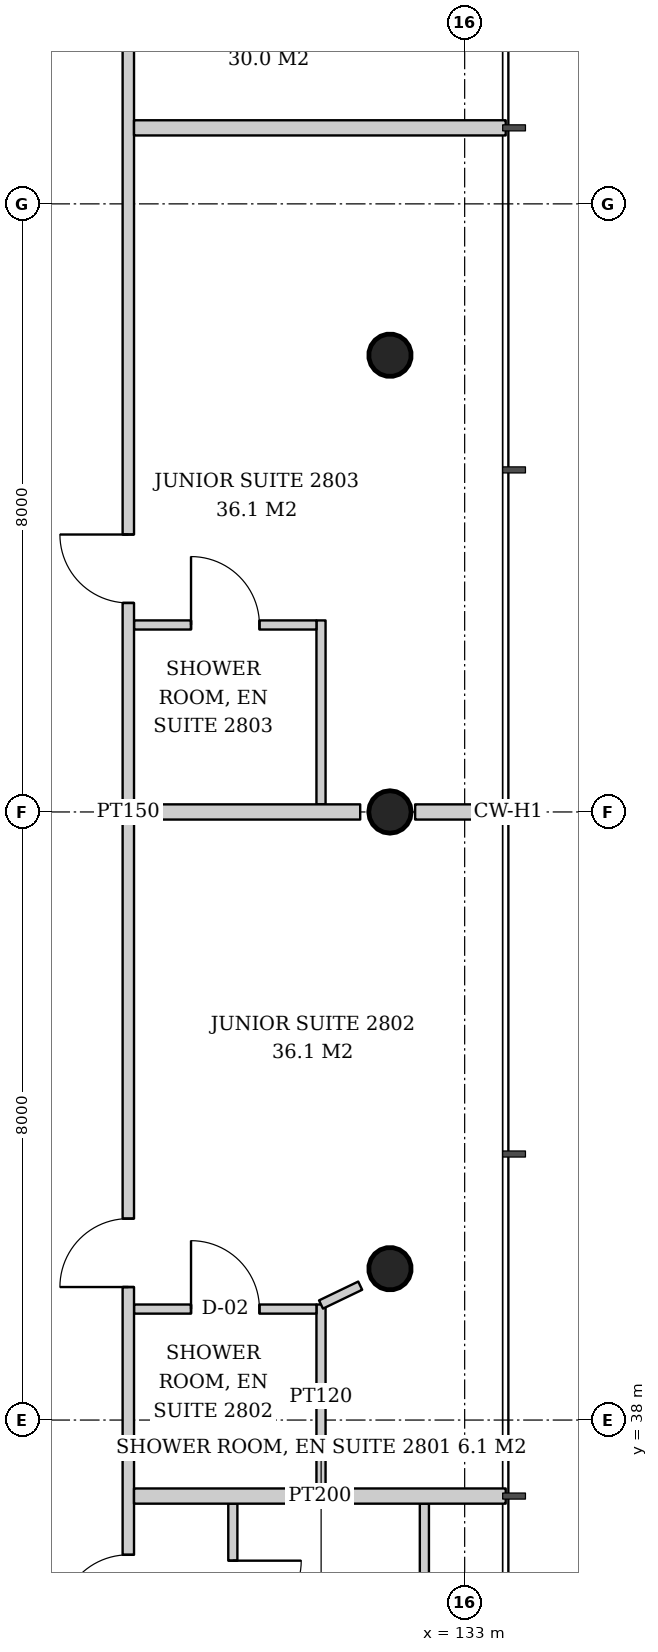
"""IFC4 building model, lengths in metres.
Left out: names, types, materials, properties, quantities, classifications, styles, units other than length and angle.
Written with IfcOpenShell. Run it as: python <this file> out.ifc"""

import sys

from ifc_helpers import new_model, si_unit, direction, frame, frame_2d, origin, origin_2d, place, context, subcontext, project, spatial, rectangle, hollow_circle, extrude, element, fill, save


model = new_model("IFC4")
c1 = context("Model", 3, precision=1e-05, world=origin(), true_north=direction((0.0, 1.0)))
c2 = subcontext(c1, "Body", "Model", "MODEL_VIEW")
j1 = project(units=[si_unit("LENGTHUNIT", "METRE"), si_unit("PLANEANGLEUNIT", "RADIAN")], contexts=[c1])
p1 = place(None, origin())
s1 = spatial("IfcSite", under=j1, at=p1, CompositionType="ELEMENT")
p2 = place(p1, origin())
s2 = spatial("IfcBuilding", under=s1, at=p2, CompositionType="ELEMENT")
p3 = place(p2, frame((0.0, 0.0, 112.2)))
s3 = spatial("IfcBuildingStorey", under=s2, at=p3, CompositionType="ELEMENT", Elevation=112.2)
p4 = place(p3, frame((132.069, 39.966, 0.0), z_axis=(-0.042995531285, 0.021497765643, 0.998843946952), x_axis=(-0.4472135955, -0.894427191, 0.0)))
e1 = element("IfcColumn", 1, at=p4, inside=s3, PredefinedType="COLUMN", context=c2, shape_type="SweptSolid", body=[
    extrude(hollow_circle(Radius=0.28, WallThickness=0.02, at=origin_2d()), origin(), (0.0, 0.0, 1.0), 3.804),
])
p5 = place(p3, frame((132.069, 46.0, 0.0), z_axis=(-0.043005470007, 0.0, 0.999074836811), x_axis=(0.0, -1.0, 0.0)))
e2 = element("IfcColumn", 2, at=p5, inside=s3, PredefinedType="COLUMN", context=c2, shape_type="SweptSolid", body=[
    extrude(hollow_circle(Radius=0.28, WallThickness=0.02, at=origin_2d()), origin(), (0.0, 0.0, 1.0), 3.803),
])
p6 = place(p3, frame((132.069, 52.034, 0.0), z_axis=(-0.042995531285, -0.021497765643, 0.998843946952), x_axis=(0.4472135955, -0.894427191, 0.0)))
e3 = element("IfcColumn", 3, at=p6, inside=s3, PredefinedType="COLUMN", context=c2, shape_type="SweptSolid", body=[
    extrude(hollow_circle(Radius=0.28, WallThickness=0.02, at=origin_2d()), origin(), (0.0, 0.0, 1.0), 3.804),
])
p7 = place(p3, frame((129.95, 36.9, 0.0), z_axis=(0.0, 0.0, 1.0), x_axis=(0.0, -1.0, 0.0)))
e4 = element("IfcWall", 4, at=p7, inside=s3, PredefinedType="PARTITIONING", context=c2, shape_type="SweptSolid", body=[
    extrude(rectangle(XDim=2.58, YDim=0.12, at=frame_2d((1.29, 0.0))), origin(), (0.0, 0.0, 1.0), 2.9),
])
p8 = place(p7, frame((0.75, 0.0, 0.0)))
e5 = element("IfcOpeningElement", 5, at=p8, cuts=e4, PredefinedType="OPENING", context=c2, shape_type="SweptSolid", body=[
    extrude(rectangle(XDim=0.9, YDim=2.1, at=frame_2d((0.45, 1.05))), frame((0.0, 0.07, 0.0), z_axis=(0.0, -1.0, 0.0), x_axis=(1.0, 0.0, 0.0)), (0.0, 0.0, 1.0), 0.14),
])
p9 = place(p3, frame((132.47, 36.9, 0.0), z_axis=(0.0, 0.0, 1.0), x_axis=(0.0, -1.0, 0.0)))
e6 = element("IfcWall", 6, at=p9, inside=s3, PredefinedType="PARTITIONING", context=c2, shape_type="SweptSolid", body=[
    extrude(rectangle(XDim=2.58, YDim=0.12, at=frame_2d((1.29, 0.0))), origin(), (0.0, 0.0, 1.0), 3.6),
])
p10 = place(p3, frame((131.11, 37.1, 0.0), z_axis=(0.0, 0.0, 1.0), x_axis=(0.0, 1.0, 0.0)))
e7 = element("IfcWall", 7, at=p10, inside=s3, PredefinedType="PARTITIONING", context=c2, shape_type="SweptSolid", body=[
    extrude(rectangle(XDim=2.42, YDim=0.12, at=frame_2d((1.21, 0.0))), origin(), (0.0, 0.0, 1.0), 3.6),
])
p11 = place(p3, frame((128.65, 39.46, 0.0), z_axis=(0.0, 0.0, 1.0), x_axis=(1.0, 0.0, 0.0)))
e8 = element("IfcWall", 8, at=p11, inside=s3, PredefinedType="PARTITIONING", context=c2, shape_type="SweptSolid", body=[
    extrude(rectangle(XDim=2.4, YDim=0.12, at=frame_2d((1.2, 0.0))), origin(), (0.0, 0.0, 1.0), 3.6),
])
p12 = place(p11, frame((0.75, 0.0, 0.0)))
e9 = element("IfcOpeningElement", 9, at=p12, cuts=e8, PredefinedType="OPENING", context=c2, shape_type="SweptSolid", body=[
    extrude(rectangle(XDim=0.9, YDim=2.1, at=frame_2d((0.45, 1.05))), frame((0.0, 0.07, 0.0), z_axis=(0.0, -1.0, 0.0), x_axis=(1.0, 0.0, 0.0)), (0.0, 0.0, 1.0), 0.14),
])
p13 = place(p3, frame((131.11, 46.1, 0.0), z_axis=(0.0, 0.0, 1.0), x_axis=(0.0, 1.0, 0.0)))
e10 = element("IfcWall", 10, at=p13, inside=s3, PredefinedType="PARTITIONING", context=c2, shape_type="SweptSolid", body=[
    extrude(rectangle(XDim=2.42, YDim=0.12, at=frame_2d((1.21, 0.0))), origin(), (0.0, 0.0, 1.0), 3.6),
])
p14 = place(p3, frame((128.65, 48.46, 0.0), z_axis=(0.0, 0.0, 1.0), x_axis=(1.0, 0.0, 0.0)))
e11 = element("IfcWall", 11, at=p14, inside=s3, PredefinedType="PARTITIONING", context=c2, shape_type="SweptSolid", body=[
    extrude(rectangle(XDim=2.4, YDim=0.12, at=frame_2d((1.2, 0.0))), origin(), (0.0, 0.0, 1.0), 3.6),
])
p15 = place(p14, frame((0.75, 0.0, 0.0)))
e12 = element("IfcOpeningElement", 12, at=p15, cuts=e11, PredefinedType="OPENING", context=c2, shape_type="SweptSolid", body=[
    extrude(rectangle(XDim=0.9, YDim=2.1, at=frame_2d((0.45, 1.05))), frame((0.0, 0.07, 0.0), z_axis=(0.0, -1.0, 0.0), x_axis=(1.0, 0.0, 0.0)), (0.0, 0.0, 1.0), 0.14),
])
p16 = place(p3, frame((128.575, 35.207, 0.0), z_axis=(0.0, 0.0, 1.0), x_axis=(0.0, 1.0, 0.0)))
e13 = element("IfcWall", 13, at=p16, inside=s3, PredefinedType="PARTITIONING", context=c2, shape_type="SweptSolid", body=[
    extrude(rectangle(XDim=21.586, YDim=0.15, at=frame_2d((10.793, 0.0))), origin(), (0.0, 0.0, 1.0), 2.9),
])
p17 = place(p16, frame((0.12, 0.0, 0.0)))
e14 = element("IfcOpeningElement", 14, at=p17, cuts=e13, PredefinedType="OPENING", context=c2, shape_type="SweptSolid", body=[
    extrude(rectangle(XDim=0.9, YDim=2.1, at=frame_2d((0.45, 1.05))), frame((0.0, 0.085, 0.0), z_axis=(0.0, -1.0, 0.0), x_axis=(1.0, 0.0, 0.0)), (0.0, 0.0, 1.0), 0.17),
])
p18 = place(p16, frame((4.543, 0.0, 0.0)))
e15 = element("IfcOpeningElement", 15, at=p18, cuts=e13, PredefinedType="OPENING", context=c2, shape_type="SweptSolid", body=[
    extrude(rectangle(XDim=0.9, YDim=2.1, at=frame_2d((0.45, 1.05))), frame((0.0, 0.085, 0.0), z_axis=(0.0, -1.0, 0.0), x_axis=(1.0, 0.0, 0.0)), (0.0, 0.0, 1.0), 0.17),
])
p19 = place(p16, frame((13.543, 0.0, 0.0)))
e16 = element("IfcOpeningElement", 16, at=p19, cuts=e13, PredefinedType="OPENING", context=c2, shape_type="SweptSolid", body=[
    extrude(rectangle(XDim=0.9, YDim=2.1, at=frame_2d((0.45, 1.05))), frame((0.0, 0.085, 0.0), z_axis=(0.0, -1.0, 0.0), x_axis=(1.0, 0.0, 0.0)), (0.0, 0.0, 1.0), 0.17),
])
p20 = place(p3, frame((128.65, 37.0, 0.0), z_axis=(0.0, 0.0, 1.0), x_axis=(1.0, 0.0, 0.0)))
e17 = element("IfcWall", 17, at=p20, inside=s3, PredefinedType="PARTITIONING", context=c2, shape_type="SweptSolid", body=[
    extrude(rectangle(XDim=4.89, YDim=0.2, at=frame_2d((2.445, 0.0))), origin(), (0.0, 0.0, 1.0), 2.9),
])
p21 = place(p3, frame((128.65, 46.0, 0.0), z_axis=(0.0, 0.0, 1.0), x_axis=(1.0, 0.0, 0.0)))
e18 = element("IfcWall", 18, at=p21, inside=s3, PredefinedType="PARTITIONING", context=c2, shape_type="SweptSolid", body=[
    extrude(rectangle(XDim=2.976, YDim=0.2, at=frame_2d((1.488, 0.0))), origin(), (0.0, 0.0, 1.0), 3.6),
])
p22 = place(p3, frame((132.348, 46.0, 0.0), z_axis=(0.0, 0.0, 1.0), x_axis=(1.0, 0.0, 0.0)))
e19 = element("IfcWall", 19, at=p22, inside=s3, PredefinedType="PARTITIONING", context=c2, shape_type="SweptSolid", body=[
    extrude(rectangle(XDim=1.192, YDim=0.2, at=frame_2d((0.596, 0.0))), origin(), (0.0, 0.0, 1.0), 3.6),
])
p23 = place(p3, frame((128.65, 55.0, 0.0), z_axis=(0.0, 0.0, 1.0), x_axis=(1.0, 0.0, 0.0)))
e20 = element("IfcWall", 20, at=p23, inside=s3, PredefinedType="PARTITIONING", context=c2, shape_type="SweptSolid", body=[
    extrude(rectangle(XDim=4.89, YDim=0.2, at=frame_2d((2.445, 0.0))), origin(), (0.0, 0.0, 1.0), 3.2),
])
p24 = place(p3, frame((131.11, 39.52, 0.0), z_axis=(0.0, 0.0, 1.0), x_axis=(0.901316511947, 0.433161107778, 0.0)))
e21 = element("IfcWall", 21, at=p24, inside=s3, PredefinedType="PARTITIONING", context=c2, shape_type="SweptSolid", body=[
    extrude(rectangle(XDim=0.572, YDim=0.12, at=frame_2d((0.286, 0.0))), origin(), (0.0, 0.0, 1.0), 3.6),
])
p25 = place(p8, origin())
e22 = element("IfcDoor", 22, at=p25, inside=s3, OperationType="SINGLE_SWING_LEFT", PredefinedType="DOOR", context=c2, shape_type="SweptSolid", body=[
    extrude(rectangle(XDim=0.9, YDim=2.1, at=frame_2d((0.45, 1.05))), frame((0.0, 0.025, 0.0), z_axis=(0.0, -1.0, 0.0), x_axis=(1.0, 0.0, 0.0)), (0.0, 0.0, 1.0), 0.05),
])
fill(e5, e22)
p26 = place(p12, origin())
e23 = element("IfcDoor", 23, at=p26, inside=s3, OperationType="SINGLE_SWING_LEFT", PredefinedType="DOOR", context=c2, shape_type="SweptSolid", body=[
    extrude(rectangle(XDim=0.9, YDim=2.1, at=frame_2d((0.45, 1.05))), frame((0.0, 0.025, 0.0), z_axis=(0.0, -1.0, 0.0), x_axis=(1.0, 0.0, 0.0)), (0.0, 0.0, 1.0), 0.05),
])
fill(e9, e23)
p27 = place(p15, origin())
e24 = element("IfcDoor", 24, at=p27, inside=s3, OperationType="SINGLE_SWING_LEFT", PredefinedType="DOOR", context=c2, shape_type="SweptSolid", body=[
    extrude(rectangle(XDim=0.9, YDim=2.1, at=frame_2d((0.45, 1.05))), frame((0.0, 0.025, 0.0), z_axis=(0.0, -1.0, 0.0), x_axis=(1.0, 0.0, 0.0)), (0.0, 0.0, 1.0), 0.05),
])
fill(e12, e24)
p28 = place(p17, origin())
e25 = element("IfcDoor", 25, at=p28, inside=s3, OperationType="SINGLE_SWING_LEFT", PredefinedType="DOOR", context=c2, shape_type="SweptSolid", body=[
    extrude(rectangle(XDim=0.9, YDim=2.1, at=frame_2d((0.45, 1.05))), frame((0.0, 0.025, 0.0), z_axis=(0.0, -1.0, 0.0), x_axis=(1.0, 0.0, 0.0)), (0.0, 0.0, 1.0), 0.05),
])
fill(e14, e25)
p29 = place(p18, origin())
e26 = element("IfcDoor", 26, at=p29, inside=s3, OperationType="SINGLE_SWING_LEFT", PredefinedType="DOOR", context=c2, shape_type="SweptSolid", body=[
    extrude(rectangle(XDim=0.9, YDim=2.1, at=frame_2d((0.45, 1.05))), frame((0.0, 0.025, 0.0), z_axis=(0.0, -1.0, 0.0), x_axis=(1.0, 0.0, 0.0)), (0.0, 0.0, 1.0), 0.05),
])
fill(e15, e26)
p30 = place(p19, origin())
e27 = element("IfcDoor", 27, at=p30, inside=s3, OperationType="SINGLE_SWING_RIGHT", PredefinedType="DOOR", context=c2, shape_type="SweptSolid", body=[
    extrude(rectangle(XDim=0.9, YDim=2.1, at=frame_2d((0.45, 1.05))), frame((0.0, 0.025, 0.0), z_axis=(0.0, -1.0, 0.0), x_axis=(1.0, 0.0, 0.0)), (0.0, 0.0, 1.0), 0.05),
])
fill(e16, e27)
save(model, sys.argv[1])
